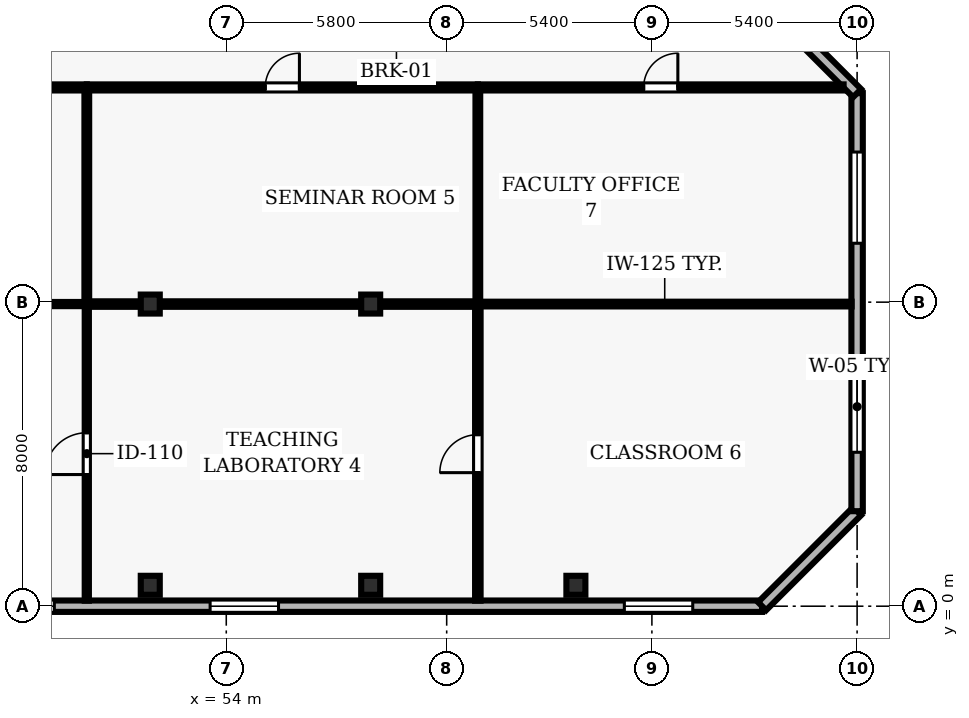
"""IFC4 building model, lengths in metres.
Left out: names, types, materials, properties, quantities, classifications, styles, units other than length and angle.
Written with IfcOpenShell. Run it as: python <this file> out.ifc"""

import sys

from ifc_helpers import new_model, si_unit, direction, frame, frame_2d, origin, origin_2d, place, context, subcontext, project, spatial, rectangle, hollow_rectangle, extrude, element, fill, save


model = new_model("IFC4")
c1 = context("Model", 3, precision=1e-05, world=origin(), true_north=direction((0.0, 1.0)))
c2 = subcontext(c1, "Body", "Model", "MODEL_VIEW")
j1 = project(units=[si_unit("LENGTHUNIT", "METRE"), si_unit("PLANEANGLEUNIT", "RADIAN")], contexts=[c1])
p1 = place(None, origin())
s1 = spatial("IfcSite", under=j1, at=p1, CompositionType="ELEMENT")
p2 = place(p1, origin())
s2 = spatial("IfcBuilding", under=s1, at=p2, CompositionType="ELEMENT")
p3 = place(p2, frame((0.0, 0.0, 111.2)))
s3 = spatial("IfcBuildingStorey", under=s2, at=p3, CompositionType="ELEMENT", Elevation=111.2)
for number, where, z_axis, x_axis in (
    (1, (52.0, 0.55, 0.0), (0.0, 0.0, 1.0), (1.0, 0.0, 0.0)),
    (2, (52.0, 7.95, 0.0), (0.0, 0.0, 1.0), (1.0, 0.0, 0.0)),
    (3, (57.8, 0.55, 0.0), (0.0, 0.0, 1.0), (1.0, 0.0, 0.0)),
    (4, (57.8, 7.95, 0.0), (0.0, 0.0, 1.0), (1.0, 0.0, 0.0)),
    (5, (63.2, 0.55, 0.0), (0.0, 0.0, 1.0), (1.0, 0.0, 0.0)),
):
    element("IfcColumn", number, at=place(p3, frame(where, z_axis=z_axis, x_axis=x_axis)), inside=s3, PredefinedType="COLUMN", context=c2, shape_type="SweptSolid", body=[
        extrude(hollow_rectangle(XDim=0.5, YDim=0.5, WallThickness=0.025, at=origin_2d()), origin(), (0.0, 0.0, 1.0), 3.9),
    ])
p4 = place(p3, frame((24.5, 0.0, 0.0), z_axis=(0.0, 0.0, 1.0), x_axis=(1.0, 0.0, 0.0)))
e6 = element("IfcWall", 6, at=p4, inside=s3, PredefinedType="SOLIDWALL", context=c2, shape_type="SweptSolid", body=[
    extrude(rectangle(XDim=43.6, YDim=0.3, at=frame_2d((21.8, 0.0))), origin(), (0.0, 0.0, 1.0), 3.69),
])
p5 = place(p4, frame((1.825, 0.0, 0.9)))
e7 = element("IfcOpeningElement", 7, at=p5, cuts=e6, PredefinedType="OPENING", context=c2, shape_type="SweptSolid", body=[
    extrude(rectangle(XDim=1.8, YDim=1.6, at=frame_2d((0.9, 0.8))), frame((0.0, 0.16, 0.0), z_axis=(0.0, -1.0, 0.0), x_axis=(1.0, 0.0, 0.0)), (0.0, 0.0, 1.0), 0.32),
])
p6 = place(p4, frame((8.175, 0.0, 0.9)))
e8 = element("IfcOpeningElement", 8, at=p6, cuts=e6, PredefinedType="OPENING", context=c2, shape_type="SweptSolid", body=[
    extrude(rectangle(XDim=1.8, YDim=1.6, at=frame_2d((0.9, 0.8))), frame((0.0, 0.16, 0.0), z_axis=(0.0, -1.0, 0.0), x_axis=(1.0, 0.0, 0.0)), (0.0, 0.0, 1.0), 0.32),
])
p7 = place(p4, frame((18.175, 0.0, 0.9)))
e9 = element("IfcOpeningElement", 9, at=p7, cuts=e6, PredefinedType="OPENING", context=c2, shape_type="SweptSolid", body=[
    extrude(rectangle(XDim=1.8, YDim=1.6, at=frame_2d((0.9, 0.8))), frame((0.0, 0.16, 0.0), z_axis=(0.0, -1.0, 0.0), x_axis=(1.0, 0.0, 0.0)), (0.0, 0.0, 1.0), 0.32),
])
p8 = place(p4, frame((23.175, 0.0, 0.9)))
e10 = element("IfcOpeningElement", 10, at=p8, cuts=e6, PredefinedType="OPENING", context=c2, shape_type="SweptSolid", body=[
    extrude(rectangle(XDim=1.8, YDim=1.6, at=frame_2d((0.9, 0.8))), frame((0.0, 0.16, 0.0), z_axis=(0.0, -1.0, 0.0), x_axis=(1.0, 0.0, 0.0)), (0.0, 0.0, 1.0), 0.32),
])
p9 = place(p4, frame((29.075, 0.0, 0.9)))
e11 = element("IfcOpeningElement", 11, at=p9, cuts=e6, PredefinedType="OPENING", context=c2, shape_type="SweptSolid", body=[
    extrude(rectangle(XDim=1.8, YDim=1.6, at=frame_2d((0.9, 0.8))), frame((0.0, 0.16, 0.0), z_axis=(0.0, -1.0, 0.0), x_axis=(1.0, 0.0, 0.0)), (0.0, 0.0, 1.0), 0.32),
])
p10 = place(p4, frame((39.975, 0.0, 0.9)))
e12 = element("IfcOpeningElement", 12, at=p10, cuts=e6, PredefinedType="OPENING", context=c2, shape_type="SweptSolid", body=[
    extrude(rectangle(XDim=1.8, YDim=1.6, at=frame_2d((0.9, 0.8))), frame((0.0, 0.16, 0.0), z_axis=(0.0, -1.0, 0.0), x_axis=(1.0, 0.0, 0.0)), (0.0, 0.0, 1.0), 0.32),
])
p11 = place(p3, frame((68.1, 0.0, 0.0), z_axis=(0.0, 0.0, 1.0), x_axis=(0.707106781187, 0.707106781187, 0.0)))
e13 = element("IfcWall", 13, at=p11, inside=s3, PredefinedType="SOLIDWALL", context=c2, shape_type="SweptSolid", body=[
    extrude(rectangle(XDim=3.536, YDim=0.3, at=frame_2d((1.768, 0.0))), origin(), (0.0, 0.0, 1.0), 3.69),
])
p12 = place(p3, frame((70.6, 2.5, 0.0), z_axis=(0.0, 0.0, 1.0), x_axis=(0.0, 1.0, 0.0)))
e14 = element("IfcWall", 14, at=p12, inside=s3, PredefinedType="SOLIDWALL", context=c2, shape_type="SweptSolid", body=[
    extrude(rectangle(XDim=11.0, YDim=0.3, at=frame_2d((5.5, 0.0))), origin(), (0.0, 0.0, 1.0), 3.69),
])
p13 = place(p12, frame((1.55, 0.0, 0.9)))
e15 = element("IfcOpeningElement", 15, at=p13, cuts=e14, PredefinedType="OPENING", context=c2, shape_type="SweptSolid", body=[
    extrude(rectangle(XDim=2.4, YDim=1.6, at=frame_2d((1.2, 0.8))), frame((0.0, 0.16, 0.0), z_axis=(0.0, -1.0, 0.0), x_axis=(1.0, 0.0, 0.0)), (0.0, 0.0, 1.0), 0.32),
])
p14 = place(p12, frame((7.05, 0.0, 0.9)))
e16 = element("IfcOpeningElement", 16, at=p14, cuts=e14, PredefinedType="OPENING", context=c2, shape_type="SweptSolid", body=[
    extrude(rectangle(XDim=2.4, YDim=1.6, at=frame_2d((1.2, 0.8))), frame((0.0, 0.16, 0.0), z_axis=(0.0, -1.0, 0.0), x_axis=(1.0, 0.0, 0.0)), (0.0, 0.0, 1.0), 0.32),
])
p15 = place(p3, frame((70.6, 13.5, 0.0), z_axis=(0.0, 0.0, 1.0), x_axis=(-0.707106781187, 0.707106781187, 0.0)))
e17 = element("IfcWall", 17, at=p15, inside=s3, PredefinedType="SOLIDWALL", context=c2, shape_type="SweptSolid", body=[
    extrude(rectangle(XDim=3.536, YDim=0.3, at=frame_2d((1.768, 0.0))), origin(), (0.0, 0.0, 1.0), 3.69),
])
p16 = place(p3, frame((40.35, 13.65, 0.0), z_axis=(0.0, 0.0, 1.0), x_axis=(1.0, 0.0, 0.0)))
e18 = element("IfcWall", 18, at=p16, inside=s3, PredefinedType="PARTITIONING", context=c2, shape_type="SweptSolid", body=[
    extrude(rectangle(XDim=9.98, YDim=0.16, at=frame_2d((4.99, 0.0))), origin(), (0.0, 0.0, 1.0), 3.69),
])
p17 = place(p16, frame((3.79, 0.0, 0.0)))
e19 = element("IfcOpeningElement", 19, at=p17, cuts=e18, PredefinedType="OPENING", context=c2, shape_type="SweptSolid", body=[
    extrude(rectangle(XDim=1.0, YDim=2.1, at=frame_2d((0.5, 1.05))), frame((0.0, 0.09, 0.0), z_axis=(0.0, -1.0, 0.0), x_axis=(1.0, 0.0, 0.0)), (0.0, 0.0, 1.0), 0.18),
])
p18 = place(p3, frame((50.33, 7.95, 0.0), z_axis=(0.0, 0.0, 1.0), x_axis=(-1.0, 0.0, 0.0)))
e20 = element("IfcWall", 20, at=p18, inside=s3, PredefinedType="MOVABLE", context=c2, shape_type="SweptSolid", body=[
    extrude(rectangle(XDim=9.98, YDim=0.11, at=frame_2d((4.99, 0.0))), origin(), (0.0, 0.0, 1.0), 3.074),
])
p19 = place(p3, frame((50.33, 13.65, 0.0), z_axis=(0.0, 0.0, 1.0), x_axis=(1.0, 0.0, 0.0)))
e21 = element("IfcWall", 21, at=p19, inside=s3, PredefinedType="PARTITIONING", context=c2, shape_type="SweptSolid", body=[
    extrude(rectangle(XDim=10.29, YDim=0.16, at=frame_2d((5.145, 0.0))), origin(), (0.0, 0.0, 1.0), 3.69),
])
p20 = place(p19, frame((4.695, 0.0, 0.0)))
e22 = element("IfcOpeningElement", 22, at=p20, cuts=e21, PredefinedType="OPENING", context=c2, shape_type="SweptSolid", body=[
    extrude(rectangle(XDim=0.9, YDim=2.1, at=frame_2d((0.45, 1.05))), frame((0.0, 0.09, 0.0), z_axis=(0.0, -1.0, 0.0), x_axis=(1.0, 0.0, 0.0)), (0.0, 0.0, 1.0), 0.18),
])
p21 = place(p3, frame((60.62, 7.95, 0.0), z_axis=(0.0, 0.0, 1.0), x_axis=(-1.0, 0.0, 0.0)))
e23 = element("IfcWall", 23, at=p21, inside=s3, PredefinedType="PARTITIONING", context=c2, shape_type="SweptSolid", body=[
    extrude(rectangle(XDim=10.29, YDim=0.145, at=frame_2d((5.145, 0.0))), origin(), (0.0, 0.0, 1.0), 3.074),
])
p22 = place(p3, frame((60.62, 13.65, 0.0), z_axis=(0.0, 0.0, 1.0), x_axis=(1.0, 0.0, 0.0)))
e24 = element("IfcWall", 24, at=p22, inside=s3, PredefinedType="PARTITIONING", context=c2, shape_type="SweptSolid", body=[
    extrude(rectangle(XDim=9.625, YDim=0.16, at=frame_2d((4.812, 0.0))), origin(), (0.0, 0.0, 1.0), 3.69),
])
p23 = place(p22, frame((4.363, 0.0, 0.0)))
e25 = element("IfcOpeningElement", 25, at=p23, cuts=e24, PredefinedType="OPENING", context=c2, shape_type="SweptSolid", body=[
    extrude(rectangle(XDim=0.9, YDim=2.1, at=frame_2d((0.45, 1.05))), frame((0.0, 0.09, 0.0), z_axis=(0.0, -1.0, 0.0), x_axis=(1.0, 0.0, 0.0)), (0.0, 0.0, 1.0), 0.18),
])
p24 = place(p3, frame((70.455, 7.95, 0.0), z_axis=(0.0, 0.0, 1.0), x_axis=(-1.0, 0.0, 0.0)))
e26 = element("IfcWall", 26, at=p24, inside=s3, PredefinedType="PARTITIONING", context=c2, shape_type="SweptSolid", body=[
    extrude(rectangle(XDim=9.835, YDim=0.125, at=frame_2d((4.917, 0.0))), origin(), (0.0, 0.0, 1.0), 3.69),
])
p25 = place(p3, frame((50.33, 0.145, 0.0), z_axis=(0.0, 0.0, 1.0), x_axis=(0.0, 1.0, 0.0)))
e27 = element("IfcWall", 27, at=p25, inside=s3, PredefinedType="MOVABLE", context=c2, shape_type="SweptSolid", body=[
    extrude(rectangle(XDim=7.738, YDim=0.11, at=frame_2d((3.869, 0.0))), origin(), (0.0, 0.0, 1.0), 3.69),
])
p26 = place(p25, frame((3.319, 0.0, 0.0)))
e28 = element("IfcOpeningElement", 28, at=p26, cuts=e27, PredefinedType="OPENING", context=c2, shape_type="SweptSolid", body=[
    extrude(rectangle(XDim=1.1, YDim=2.15, at=frame_2d((0.55, 1.075))), frame((0.0, 0.065, 0.0), z_axis=(0.0, -1.0, 0.0), x_axis=(1.0, 0.0, 0.0)), (0.0, 0.0, 1.0), 0.13),
])
p27 = place(p3, frame((50.33, 8.018, 0.0), z_axis=(0.0, 0.0, 1.0), x_axis=(0.0, 1.0, 0.0)))
e29 = element("IfcWall", 29, at=p27, inside=s3, PredefinedType="PARTITIONING", context=c2, shape_type="SweptSolid", body=[
    extrude(rectangle(XDim=5.557, YDim=0.125, at=frame_2d((2.778, 0.0))), origin(), (0.0, 0.0, 1.0), 3.69),
])
p28 = place(p3, frame((60.62, 0.145, 0.0), z_axis=(0.0, 0.0, 1.0), x_axis=(0.0, 1.0, 0.0)))
e30 = element("IfcWall", 30, at=p28, inside=s3, PredefinedType="PARTITIONING", context=c2, shape_type="SweptSolid", body=[
    extrude(rectangle(XDim=7.738, YDim=0.145, at=frame_2d((3.869, 0.0))), origin(), (0.0, 0.0, 1.0), 3.69),
])
p29 = place(p28, frame((3.369, 0.0, 0.0)))
e31 = element("IfcOpeningElement", 31, at=p29, cuts=e30, PredefinedType="OPENING", context=c2, shape_type="SweptSolid", body=[
    extrude(rectangle(XDim=1.0, YDim=2.1, at=frame_2d((0.5, 1.05))), frame((0.0, 0.083, 0.0), z_axis=(0.0, -1.0, 0.0), x_axis=(1.0, 0.0, 0.0)), (0.0, 0.0, 1.0), 0.165),
])
p30 = place(p3, frame((60.62, 8.018, 0.0), z_axis=(0.0, 0.0, 1.0), x_axis=(0.0, 1.0, 0.0)))
e32 = element("IfcWall", 32, at=p30, inside=s3, PredefinedType="PARTITIONING", context=c2, shape_type="SweptSolid", body=[
    extrude(rectangle(XDim=5.557, YDim=0.125, at=frame_2d((2.778, 0.0))), origin(), (0.0, 0.0, 1.0), 3.69),
])
p31 = place(p8, origin())
e33 = element("IfcWindow", 33, at=p31, inside=s3, PartitioningType="SINGLE_PANEL", PredefinedType="WINDOW", context=c2, shape_type="SweptSolid", body=[
    extrude(rectangle(XDim=1.8, YDim=1.6, at=frame_2d((0.9, 0.8))), frame((0.0, 0.03, 0.0), z_axis=(0.0, -1.0, 0.0), x_axis=(1.0, 0.0, 0.0)), (0.0, 0.0, 1.0), 0.06),
])
fill(e10, e33)
p32 = place(p9, origin())
e34 = element("IfcWindow", 34, at=p32, inside=s3, PartitioningType="SINGLE_PANEL", PredefinedType="WINDOW", context=c2, shape_type="SweptSolid", body=[
    extrude(rectangle(XDim=1.8, YDim=1.6, at=frame_2d((0.9, 0.8))), frame((0.0, 0.03, 0.0), z_axis=(0.0, -1.0, 0.0), x_axis=(1.0, 0.0, 0.0)), (0.0, 0.0, 1.0), 0.06),
])
fill(e11, e34)
p33 = place(p10, origin())
e35 = element("IfcWindow", 35, at=p33, inside=s3, PartitioningType="SINGLE_PANEL", PredefinedType="WINDOW", context=c2, shape_type="SweptSolid", body=[
    extrude(rectangle(XDim=1.8, YDim=1.6, at=frame_2d((0.9, 0.8))), frame((0.0, 0.03, 0.0), z_axis=(0.0, -1.0, 0.0), x_axis=(1.0, 0.0, 0.0)), (0.0, 0.0, 1.0), 0.06),
])
fill(e12, e35)
p34 = place(p13, origin())
e36 = element("IfcWindow", 36, at=p34, inside=s3, PartitioningType="SINGLE_PANEL", PredefinedType="WINDOW", context=c2, shape_type="SweptSolid", body=[
    extrude(rectangle(XDim=2.4, YDim=1.6, at=frame_2d((1.2, 0.8))), frame((0.0, 0.03, 0.0), z_axis=(0.0, -1.0, 0.0), x_axis=(1.0, 0.0, 0.0)), (0.0, 0.0, 1.0), 0.06),
])
fill(e15, e36)
p35 = place(p14, origin())
e37 = element("IfcWindow", 37, at=p35, inside=s3, PartitioningType="SINGLE_PANEL", PredefinedType="WINDOW", context=c2, shape_type="SweptSolid", body=[
    extrude(rectangle(XDim=2.4, YDim=1.6, at=frame_2d((1.2, 0.8))), frame((0.0, 0.03, 0.0), z_axis=(0.0, -1.0, 0.0), x_axis=(1.0, 0.0, 0.0)), (0.0, 0.0, 1.0), 0.06),
])
fill(e16, e37)
p36 = place(p26, origin())
e38 = element("IfcDoor", 38, at=p36, inside=s3, OperationType="SINGLE_SWING_LEFT", PredefinedType="DOOR", context=c2, shape_type="SweptSolid", body=[
    extrude(rectangle(XDim=1.1, YDim=2.15, at=frame_2d((0.55, 1.075))), frame((0.0, 0.025, 0.0), z_axis=(0.0, -1.0, 0.0), x_axis=(1.0, 0.0, 0.0)), (0.0, 0.0, 1.0), 0.05),
])
fill(e28, e38)
p37 = place(p20, origin())
e39 = element("IfcDoor", 39, at=p37, inside=s3, OperationType="SINGLE_SWING_RIGHT", PredefinedType="DOOR", context=c2, shape_type="SweptSolid", body=[
    extrude(rectangle(XDim=0.9, YDim=2.1, at=frame_2d((0.45, 1.05))), frame((0.0, 0.025, 0.0), z_axis=(0.0, -1.0, 0.0), x_axis=(1.0, 0.0, 0.0)), (0.0, 0.0, 1.0), 0.05),
])
fill(e22, e39)
p38 = place(p29, origin())
e40 = element("IfcDoor", 40, at=p38, inside=s3, OperationType="SINGLE_SWING_LEFT", PredefinedType="DOOR", context=c2, shape_type="SweptSolid", body=[
    extrude(rectangle(XDim=1.0, YDim=2.1, at=frame_2d((0.5, 1.05))), frame((0.0, 0.025, 0.0), z_axis=(0.0, -1.0, 0.0), x_axis=(1.0, 0.0, 0.0)), (0.0, 0.0, 1.0), 0.05),
])
fill(e31, e40)
p39 = place(p23, origin())
e41 = element("IfcDoor", 41, at=p39, inside=s3, OperationType="SINGLE_SWING_RIGHT", PredefinedType="DOOR", context=c2, shape_type="SweptSolid", body=[
    extrude(rectangle(XDim=0.9, YDim=2.1, at=frame_2d((0.45, 1.05))), frame((0.0, 0.025, 0.0), z_axis=(0.0, -1.0, 0.0), x_axis=(1.0, 0.0, 0.0)), (0.0, 0.0, 1.0), 0.05),
])
fill(e25, e41)
save(model, sys.argv[1])
